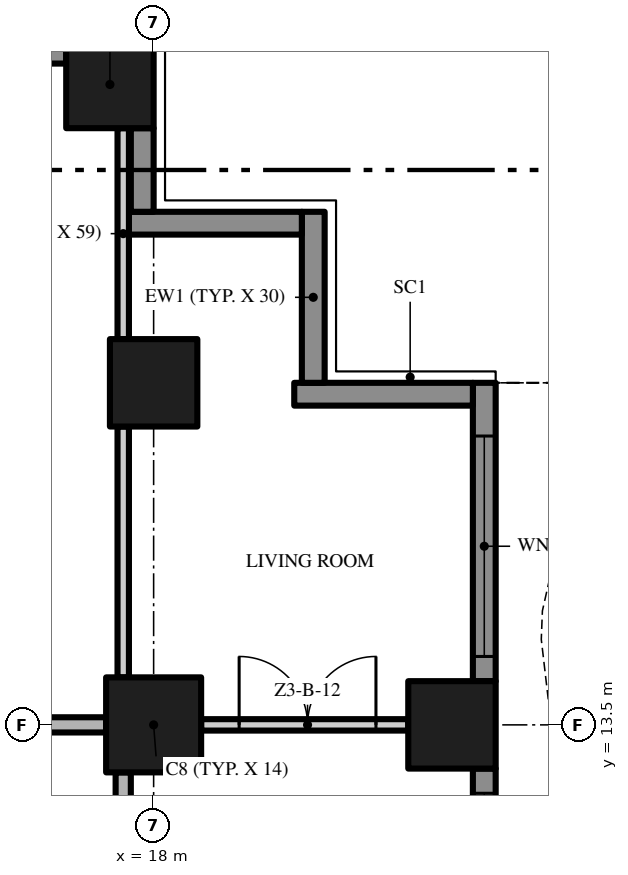
"""IFC4 building model, lengths in metres.
Left out: names, types, materials, properties, quantities, classifications, styles, units other than length and angle.
Written with IfcOpenShell. Run it as: python <this file> out.ifc"""

import sys

from ifc_helpers import new_model, si_unit, direction, frame, frame_2d, origin, origin_2d, place, context, subcontext, project, spatial, polyline, rectangle, outline, extrude, element, fill, save


model = new_model("IFC4")
c1 = context("Model", 3, precision=1e-05, world=origin(), true_north=direction((0.0, 1.0)))
c2 = subcontext(c1, "Body", "Model", "MODEL_VIEW")
j1 = project(units=[si_unit("LENGTHUNIT", "METRE"), si_unit("PLANEANGLEUNIT", "RADIAN")], contexts=[c1])
p1 = place(None, origin())
s1 = spatial("IfcSite", under=j1, at=p1, CompositionType="ELEMENT")
p2 = place(p1, origin())
s2 = spatial("IfcBuilding", under=s1, at=p2, CompositionType="ELEMENT")
p3 = place(p2, frame((0.0, 0.0, 140.2)))
s3 = spatial("IfcBuildingStorey", under=s2, at=p3, CompositionType="ELEMENT", Elevation=140.2)
p4 = place(p3, frame((18.0, 13.5, 0.0), z_axis=(0.0, 0.0, 1.0), x_axis=(1.0, 0.0, 0.0)))
e1 = element("IfcColumn", 1, at=p4, inside=s3, PredefinedType="COLUMN", context=c2, shape_type="SweptSolid", body=[
    extrude(rectangle(XDim=1.25, YDim=1.25, at=origin_2d()), origin(), (0.0, 0.0, 1.0), 3.5),
])
for number, where, z_axis, x_axis in (
    (2, (17.425, 21.925, 0.0), (0.0, 0.0, 1.0), (1.0, 0.0, 0.0)),
    (3, (21.925, 13.5, 0.0), (0.0, 0.0, 1.0), (1.0, 0.0, 0.0)),
    (4, (18.0, 18.0, 0.0), (0.0, 0.0, 1.0), (1.0, 0.0, 0.0)),
):
    element("IfcColumn", number, at=place(p3, frame(where, z_axis=z_axis, x_axis=x_axis)), inside=s3, PredefinedType="COLUMN", context=c2, shape_type="SweptSolid", body=[
        extrude(rectangle(XDim=1.15, YDim=1.15, at=origin_2d()), origin(), (0.0, 0.0, 1.0), 3.5),
    ])
p5 = place(p3, frame((22.35, 12.925, 0.0), z_axis=(0.0, 0.0, 1.0), x_axis=(0.0, -1.0, 0.0)))
e5 = element("IfcWall", 5, at=p5, inside=s3, PredefinedType="SOLIDWALL", context=c2, shape_type="SweptSolid", body=[
    extrude(rectangle(XDim=7.85, YDim=0.3, at=frame_2d((3.925, 0.0))), origin(), (0.0, 0.0, 1.0), 3.5),
])
p6 = place(p5, frame((4.625, 0.0, 0.0)))
e6 = element("IfcOpeningElement", 6, at=p6, cuts=e5, PredefinedType="OPENING", context=c2, shape_type="SweptSolid", body=[
    extrude(rectangle(XDim=2.9, YDim=2.4, at=frame_2d((1.45, 1.2))), frame((0.0, 0.16, 0.0), z_axis=(0.0, -1.0, 0.0), x_axis=(1.0, 0.0, 0.0)), (0.0, 0.0, 1.0), 0.32),
])
p7 = place(p5, frame((0.325, 0.0, 0.45)))
e7 = element("IfcOpeningElement", 7, at=p7, cuts=e5, PredefinedType="OPENING", context=c2, shape_type="SweptSolid", body=[
    extrude(rectangle(XDim=2.9, YDim=2.65, at=frame_2d((1.45, 1.325))), frame((0.0, 0.16, 0.0), z_axis=(0.0, -1.0, 0.0), x_axis=(1.0, 0.0, 0.0)), (0.0, 0.0, 1.0), 0.32),
])
p8 = place(p3, frame((22.35, 18.0, 0.0), z_axis=(0.0, 0.0, 1.0), x_axis=(0.0, -1.0, 0.0)))
e8 = element("IfcWall", 8, at=p8, inside=s3, PredefinedType="SOLIDWALL", context=c2, shape_type="SweptSolid", body=[
    extrude(rectangle(XDim=3.925, YDim=0.3, at=frame_2d((1.962, 0.0))), origin(), (0.0, 0.0, 1.0), 3.5),
])
p9 = place(p8, frame((0.7, 0.0, 0.45)))
e9 = element("IfcOpeningElement", 9, at=p9, cuts=e8, PredefinedType="OPENING", context=c2, shape_type="SweptSolid", body=[
    extrude(rectangle(XDim=2.9, YDim=2.65, at=frame_2d((1.45, 1.325))), frame((0.0, 0.16, 0.0), z_axis=(0.0, -1.0, 0.0), x_axis=(1.0, 0.0, 0.0)), (0.0, 0.0, 1.0), 0.32),
])
p10 = place(p3, frame((19.85, 17.85, 0.0), z_axis=(0.0, 0.0, 1.0), x_axis=(1.0, 0.0, 0.0)))
e10 = element("IfcWall", 10, at=p10, inside=s3, PredefinedType="SOLIDWALL", context=c2, shape_type="SweptSolid", body=[
    extrude(rectangle(XDim=2.35, YDim=0.3, at=frame_2d((1.175, 0.0))), origin(), (0.0, 0.0, 1.0), 3.5),
])
p11 = place(p3, frame((20.1, 20.25, 0.0), z_axis=(0.0, 0.0, 1.0), x_axis=(0.0, -1.0, 0.0)))
e11 = element("IfcWall", 11, at=p11, inside=s3, PredefinedType="SOLIDWALL", context=c2, shape_type="SweptSolid", body=[
    extrude(rectangle(XDim=2.25, YDim=0.3, at=frame_2d((1.125, 0.0))), origin(), (0.0, 0.0, 1.0), 3.5),
])
p12 = place(p3, frame((17.6, 20.1, 0.0), z_axis=(0.0, 0.0, 1.0), x_axis=(1.0, 0.0, 0.0)))
e12 = element("IfcWall", 12, at=p12, inside=s3, PredefinedType="SOLIDWALL", context=c2, shape_type="SweptSolid", body=[
    extrude(rectangle(XDim=2.35, YDim=0.3, at=frame_2d((1.175, 0.0))), origin(), (0.0, 0.0, 1.0), 3.5),
])
p13 = place(p3, frame((17.85, 21.35, 0.0), z_axis=(0.0, 0.0, 1.0), x_axis=(0.0, -1.0, 0.0)))
e13 = element("IfcWall", 13, at=p13, inside=s3, PredefinedType="SOLIDWALL", context=c2, shape_type="SweptSolid", body=[
    extrude(rectangle(XDim=1.1, YDim=0.3, at=frame_2d((0.55, 0.0))), origin(), (0.0, 0.0, 1.0), 3.5),
])
p14 = place(p3, frame((13.5, 22.35, 0.0), z_axis=(0.0, 0.0, 1.0), x_axis=(1.0, 0.0, 0.0)))
e14 = element("IfcWall", 14, at=p14, inside=s3, PredefinedType="SOLIDWALL", context=c2, shape_type="SweptSolid", body=[
    extrude(rectangle(XDim=3.35, YDim=0.3, at=frame_2d((1.675, 0.0))), origin(), (0.0, 0.0, 1.0), 3.5),
])
p15 = place(p14, frame((0.7, 0.0, 0.0)))
e15 = element("IfcOpeningElement", 15, at=p15, cuts=e14, PredefinedType="OPENING", context=c2, shape_type="SweptSolid", body=[
    extrude(rectangle(XDim=1.8, YDim=2.4, at=frame_2d((0.9, 1.2))), frame((0.0, 0.16, 0.0), z_axis=(0.0, -1.0, 0.0), x_axis=(1.0, 0.0, 0.0)), (0.0, 0.0, 1.0), 0.32),
])
p16 = place(p3, origin())
e16 = element("IfcWall", 16, at=p16, inside=s3, PredefinedType="USERDEFINED", context=c2, shape_type="SweptSolid", body=[
    extrude(outline(polyline([(23.451, -13.5), (24.112, -12.0), (24.845, -10.5), (25.369, -9.0), (25.5, -7.875), (25.485, -7.5), (25.149, -6.0), (24.488, -4.5), (23.755, -3.0), (23.231, -1.5), (23.1, -0.375), (23.115, 0.0), (23.451, 1.5), (24.112, 3.0), (24.845, 4.5), (25.369, 6.0), (25.5, 7.125), (25.485, 7.5), (25.149, 9.0), (24.488, 10.5), (23.755, 12.0), (23.231, 13.5), (23.1, 14.625), (23.115, 15.0), (23.451, 16.5), (24.112, 18.0), (23.883, 18.101), (23.213, 16.579), (22.866, 15.033), (22.849, 14.615), (22.986, 13.444), (23.524, 11.904), (24.261, 10.395), (24.91, 8.921), (25.236, 7.467), (25.249, 7.135), (25.124, 6.056), (24.614, 4.596), (23.885, 3.105), (23.213, 1.579), (22.866, 0.033), (22.849, -0.385), (22.986, -1.556), (23.524, -3.096), (24.261, -4.605), (24.91, -6.079), (25.236, -7.533), (25.249, -7.865), (25.124, -8.944), (24.614, -10.404), (23.885, -11.895), (23.223, -13.399), (23.451, -13.5)])), origin(), (0.0, 0.0, 1.0), 0.9),
])
p17 = place(p3, frame((13.5, 13.5, 0.0), z_axis=(0.0, 0.0, 1.0), x_axis=(1.0, 0.0, 0.0)))
e17 = element("IfcWall", 17, at=p17, inside=s3, PredefinedType="PARTITIONING", context=c2, shape_type="SweptSolid", body=[
    extrude(rectangle(XDim=3.875, YDim=0.2, at=frame_2d((1.938, 0.0))), origin(), (0.0, 0.0, 1.0), 3.5),
])
p18 = place(p17, frame((1.6, 0.0, 0.0)))
e18 = element("IfcOpeningElement", 18, at=p18, cuts=e17, PredefinedType="OPENING", context=c2, shape_type="SweptSolid", body=[
    extrude(rectangle(XDim=0.9, YDim=2.1, at=frame_2d((0.45, 1.05))), frame((0.0, 0.11, 0.0), z_axis=(0.0, -1.0, 0.0), x_axis=(1.0, 0.0, 0.0)), (0.0, 0.0, 1.0), 0.22),
])
p19 = place(p3, frame((18.625, 13.5, 0.0), z_axis=(0.0, 0.0, 1.0), x_axis=(1.0, 0.0, 0.0)))
e19 = element("IfcWall", 19, at=p19, inside=s3, PredefinedType="PARTITIONING", context=c2, shape_type="SweptSolid", body=[
    extrude(rectangle(XDim=2.725, YDim=0.15, at=frame_2d((1.363, 0.0))), origin(), (0.0, 0.0, 1.0), 3.5),
])
p20 = place(p19, frame((0.5, 0.0, 0.0)))
e20 = element("IfcOpeningElement", 20, at=p20, cuts=e19, PredefinedType="OPENING", context=c2, shape_type="SweptSolid", body=[
    extrude(rectangle(XDim=1.8, YDim=2.4, at=frame_2d((0.9, 1.2))), frame((0.0, 0.085, 0.0), z_axis=(0.0, -1.0, 0.0), x_axis=(1.0, 0.0, 0.0)), (0.0, 0.0, 1.0), 0.17),
])
p21 = place(p3, frame((17.6, 12.875, 0.0), z_axis=(0.0, 0.0, 1.0), x_axis=(0.0, -1.0, 0.0)))
e21 = element("IfcWall", 21, at=p21, inside=s3, PredefinedType="PARTITIONING", context=c2, shape_type="SweptSolid", body=[
    extrude(rectangle(XDim=7.75, YDim=0.2, at=frame_2d((3.875, 0.0))), origin(), (0.0, 0.0, 1.0), 3.5),
])
p22 = place(p21, frame((5.55, 0.0, 0.0)))
e22 = element("IfcOpeningElement", 22, at=p22, cuts=e21, PredefinedType="OPENING", context=c2, shape_type="SweptSolid", body=[
    extrude(rectangle(XDim=1.2, YDim=2.4, at=frame_2d((0.6, 1.2))), frame((0.0, 0.11, 0.0), z_axis=(0.0, -1.0, 0.0), x_axis=(1.0, 0.0, 0.0)), (0.0, 0.0, 1.0), 0.22),
])
p23 = place(p3, frame((17.6, 14.125, 0.0), z_axis=(0.0, 0.0, 1.0), x_axis=(0.0, 1.0, 0.0)))
e23 = element("IfcWall", 23, at=p23, inside=s3, PredefinedType="PARTITIONING", context=c2, shape_type="SweptSolid", body=[
    extrude(rectangle(XDim=3.3, YDim=0.15, at=frame_2d((1.65, 0.0))), origin(), (0.0, 0.0, 1.0), 3.5),
])
p24 = place(p3, frame((17.6, 18.575, 0.0), z_axis=(0.0, 0.0, 1.0), x_axis=(0.0, 1.0, 0.0)))
e24 = element("IfcWall", 24, at=p24, inside=s3, PredefinedType="PARTITIONING", context=c2, shape_type="SweptSolid", body=[
    extrude(rectangle(XDim=2.775, YDim=0.15, at=frame_2d((1.387, 0.0))), origin(), (0.0, 0.0, 1.0), 3.5),
])
p25 = place(p7, origin())
e25 = element("IfcWindow", 25, at=p25, inside=s3, PartitioningType="SINGLE_PANEL", PredefinedType="WINDOW", context=c2, shape_type="SweptSolid", body=[
    extrude(rectangle(XDim=2.9, YDim=2.65, at=frame_2d((1.45, 1.325))), frame((0.0, 0.03, 0.0), z_axis=(0.0, -1.0, 0.0), x_axis=(1.0, 0.0, 0.0)), (0.0, 0.0, 1.0), 0.06),
])
fill(e7, e25)
p26 = place(p9, origin())
e26 = element("IfcWindow", 26, at=p26, inside=s3, PartitioningType="SINGLE_PANEL", PredefinedType="WINDOW", context=c2, shape_type="SweptSolid", body=[
    extrude(rectangle(XDim=2.9, YDim=2.65, at=frame_2d((1.45, 1.325))), frame((0.0, 0.03, 0.0), z_axis=(0.0, -1.0, 0.0), x_axis=(1.0, 0.0, 0.0)), (0.0, 0.0, 1.0), 0.06),
])
fill(e9, e26)
p27 = place(p20, origin())
e27 = element("IfcDoor", 27, at=p27, inside=s3, OperationType="DOUBLE_DOOR_SINGLE_SWING", PredefinedType="DOOR", context=c2, shape_type="SweptSolid", body=[
    extrude(rectangle(XDim=1.8, YDim=2.4, at=frame_2d((0.9, 1.2))), frame((0.0, 0.025, 0.0), z_axis=(0.0, -1.0, 0.0), x_axis=(1.0, 0.0, 0.0)), (0.0, 0.0, 1.0), 0.05),
])
fill(e20, e27)
save(model, sys.argv[1])
